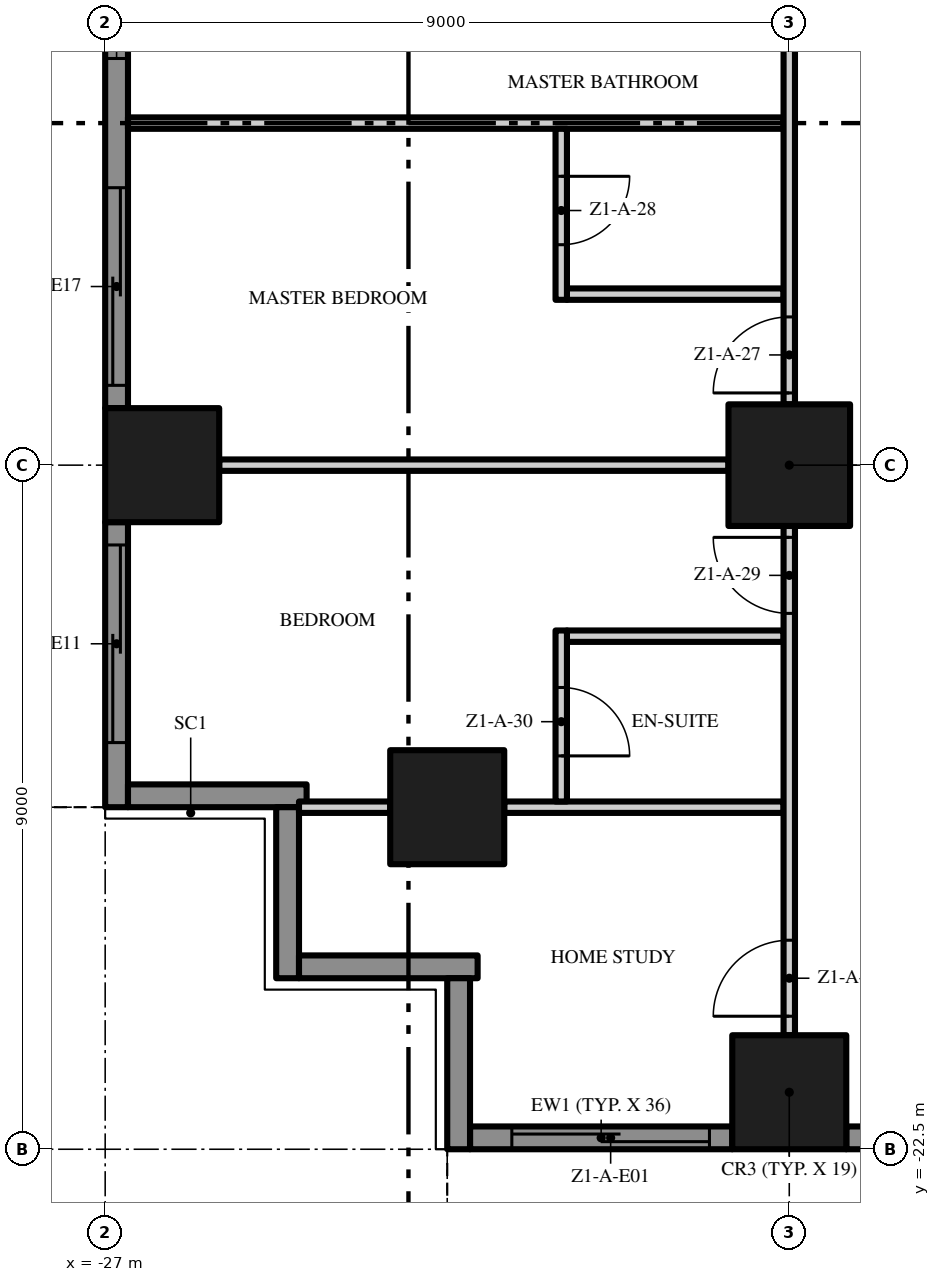
"""IFC4 building model, lengths in metres.
Left out: names, types, materials, properties, quantities, classifications, styles, units other than length and angle.
Written with IfcOpenShell. Run it as: python <this file> out.ifc"""

import sys

from ifc_helpers import new_model, si_unit, direction, frame, frame_2d, origin, origin_2d, place, context, subcontext, project, spatial, polyline, rectangle, outline, extrude, element, fill, save


model = new_model("IFC4")
c1 = context("Model", 3, precision=1e-05, world=origin(), true_north=direction((0.0, 1.0)))
c2 = subcontext(c1, "Body", "Model", "MODEL_VIEW")
j1 = project(units=[si_unit("LENGTHUNIT", "METRE"), si_unit("PLANEANGLEUNIT", "RADIAN")], contexts=[c1])
p1 = place(None, origin())
s1 = spatial("IfcSite", under=j1, at=p1, CompositionType="ELEMENT")
p2 = place(p1, origin())
s2 = spatial("IfcBuilding", under=s1, at=p2, CompositionType="ELEMENT")
p3 = place(p2, frame((0.0, 0.0, 18.8)))
s3 = spatial("IfcBuildingStorey", under=s2, at=p3, CompositionType="ELEMENT", Elevation=18.8)
p4 = place(p3, frame((-18.0, -13.5, 0.0), z_axis=(0.0, 0.0, 1.0), x_axis=(1.0, 0.0, 0.0)))
e1 = element("IfcColumn", 1, at=p4, inside=s3, PredefinedType="COLUMN", context=c2, shape_type="SweptSolid", body=[
    extrude(rectangle(XDim=1.6, YDim=1.6, at=origin_2d()), origin(), (0.0, 0.0, 1.0), 3.5),
])
for number, where, z_axis, x_axis in (
    (2, (-18.0, -21.75, 0.0), (0.0, 0.0, 1.0), (1.0, 0.0, 0.0)),
    (3, (-26.25, -13.5, 0.0), (0.0, 0.0, 1.0), (1.0, 0.0, 0.0)),
    (4, (-22.5, -18.0, 0.0), (0.0, 0.0, 1.0), (1.0, 0.0, 0.0)),
):
    element("IfcColumn", number, at=place(p3, frame(where, z_axis=z_axis, x_axis=x_axis)), inside=s3, PredefinedType="COLUMN", context=c2, shape_type="SweptSolid", body=[
        extrude(rectangle(XDim=1.5, YDim=1.5, at=origin_2d()), origin(), (0.0, 0.0, 1.0), 3.5),
    ])
p5 = place(p3, frame((-18.75, -22.35, 0.0), z_axis=(0.0, 0.0, 1.0), x_axis=(-1.0, 0.0, 0.0)))
e5 = element("IfcWall", 5, at=p5, inside=s3, PredefinedType="SOLIDWALL", context=c2, shape_type="SweptSolid", body=[
    extrude(rectangle(XDim=3.45, YDim=0.3, at=frame_2d((1.725, 0.0))), origin(), (0.0, 0.0, 1.0), 3.5),
])
p6 = place(p5, frame((0.3, 0.0, 0.0)))
e6 = element("IfcOpeningElement", 6, at=p6, cuts=e5, PredefinedType="OPENING", context=c2, shape_type="SweptSolid", body=[
    extrude(rectangle(XDim=2.6, YDim=2.4, at=frame_2d((1.3, 1.2))), frame((0.0, 0.16, 0.0), z_axis=(0.0, -1.0, 0.0), x_axis=(1.0, 0.0, 0.0)), (0.0, 0.0, 1.0), 0.32),
])
p7 = place(p3, frame((-9.75, -22.35, 0.0), z_axis=(0.0, 0.0, 1.0), x_axis=(-1.0, 0.0, 0.0)))
e7 = element("IfcWall", 7, at=p7, inside=s3, PredefinedType="SOLIDWALL", context=c2, shape_type="SweptSolid", body=[
    extrude(rectangle(XDim=7.5, YDim=0.3, at=frame_2d((3.75, 0.0))), origin(), (0.0, 0.0, 1.0), 3.5),
])
p8 = place(p7, frame((4.6, 0.0, 0.45)))
e8 = element("IfcOpeningElement", 8, at=p8, cuts=e7, PredefinedType="OPENING", context=c2, shape_type="SweptSolid", body=[
    extrude(rectangle(XDim=2.6, YDim=2.65, at=frame_2d((1.3, 1.325))), frame((0.0, 0.16, 0.0), z_axis=(0.0, -1.0, 0.0), x_axis=(1.0, 0.0, 0.0)), (0.0, 0.0, 1.0), 0.32),
])
p9 = place(p7, frame((0.3, 0.0, 0.45)))
e9 = element("IfcOpeningElement", 9, at=p9, cuts=e7, PredefinedType="OPENING", context=c2, shape_type="SweptSolid", body=[
    extrude(rectangle(XDim=2.6, YDim=2.65, at=frame_2d((1.3, 1.325))), frame((0.0, 0.16, 0.0), z_axis=(0.0, -1.0, 0.0), x_axis=(1.0, 0.0, 0.0)), (0.0, 0.0, 1.0), 0.32),
])
p10 = place(p3, frame((-26.85, -12.75, 0.0), z_axis=(0.0, 0.0, 1.0), x_axis=(0.0, 1.0, 0.0)))
e10 = element("IfcWall", 10, at=p10, inside=s3, PredefinedType="SOLIDWALL", context=c2, shape_type="SweptSolid", body=[
    extrude(rectangle(XDim=7.5, YDim=0.3, at=frame_2d((3.75, 0.0))), origin(), (0.0, 0.0, 1.0), 3.5),
])
p11 = place(p10, frame((4.6, 0.0, 0.45)))
e11 = element("IfcOpeningElement", 11, at=p11, cuts=e10, PredefinedType="OPENING", context=c2, shape_type="SweptSolid", body=[
    extrude(rectangle(XDim=2.6, YDim=2.65, at=frame_2d((1.3, 1.325))), frame((0.0, 0.16, 0.0), z_axis=(0.0, -1.0, 0.0), x_axis=(1.0, 0.0, 0.0)), (0.0, 0.0, 1.0), 0.32),
])
p12 = place(p10, frame((0.3, 0.0, 0.0)))
e12 = element("IfcOpeningElement", 12, at=p12, cuts=e10, PredefinedType="OPENING", context=c2, shape_type="SweptSolid", body=[
    extrude(rectangle(XDim=2.6, YDim=2.4, at=frame_2d((1.3, 1.2))), frame((0.0, 0.16, 0.0), z_axis=(0.0, -1.0, 0.0), x_axis=(1.0, 0.0, 0.0)), (0.0, 0.0, 1.0), 0.32),
])
p13 = place(p3, frame((-26.85, -18.0, 0.0), z_axis=(0.0, 0.0, 1.0), x_axis=(0.0, 1.0, 0.0)))
e13 = element("IfcWall", 13, at=p13, inside=s3, PredefinedType="SOLIDWALL", context=c2, shape_type="SweptSolid", body=[
    extrude(rectangle(XDim=3.75, YDim=0.3, at=frame_2d((1.875, 0.0))), origin(), (0.0, 0.0, 1.0), 3.5),
])
p14 = place(p13, frame((0.85, 0.0, 0.0)))
e14 = element("IfcOpeningElement", 14, at=p14, cuts=e13, PredefinedType="OPENING", context=c2, shape_type="SweptSolid", body=[
    extrude(rectangle(XDim=2.6, YDim=2.4, at=frame_2d((1.3, 1.2))), frame((0.0, 0.16, 0.0), z_axis=(0.0, -1.0, 0.0), x_axis=(1.0, 0.0, 0.0)), (0.0, 0.0, 1.0), 0.32),
])
p15 = place(p3, frame((-24.35, -17.85, 0.0), z_axis=(0.0, 0.0, 1.0), x_axis=(-1.0, 0.0, 0.0)))
e15 = element("IfcWall", 15, at=p15, inside=s3, PredefinedType="SOLIDWALL", context=c2, shape_type="SweptSolid", body=[
    extrude(rectangle(XDim=2.35, YDim=0.3, at=frame_2d((1.175, 0.0))), origin(), (0.0, 0.0, 1.0), 3.5),
])
p16 = place(p3, frame((-24.6, -20.25, 0.0), z_axis=(0.0, 0.0, 1.0), x_axis=(0.0, 1.0, 0.0)))
e16 = element("IfcWall", 16, at=p16, inside=s3, PredefinedType="SOLIDWALL", context=c2, shape_type="SweptSolid", body=[
    extrude(rectangle(XDim=2.25, YDim=0.3, at=frame_2d((1.125, 0.0))), origin(), (0.0, 0.0, 1.0), 3.5),
])
p17 = place(p3, frame((-22.1, -20.1, 0.0), z_axis=(0.0, 0.0, 1.0), x_axis=(-1.0, 0.0, 0.0)))
e17 = element("IfcWall", 17, at=p17, inside=s3, PredefinedType="SOLIDWALL", context=c2, shape_type="SweptSolid", body=[
    extrude(rectangle(XDim=2.35, YDim=0.3, at=frame_2d((1.175, 0.0))), origin(), (0.0, 0.0, 1.0), 3.5),
])
p18 = place(p3, frame((-22.35, -22.5, 0.0), z_axis=(0.0, 0.0, 1.0), x_axis=(0.0, 1.0, 0.0)))
e18 = element("IfcWall", 18, at=p18, inside=s3, PredefinedType="SOLIDWALL", context=c2, shape_type="SweptSolid", body=[
    extrude(rectangle(XDim=2.25, YDim=0.3, at=frame_2d((1.125, 0.0))), origin(), (0.0, 0.0, 1.0), 3.5),
])
p19 = place(p3, origin())
e19 = element("IfcWall", 19, at=p19, inside=s3, PredefinedType="USERDEFINED", context=c2, shape_type="SweptSolid", body=[
    extrude(outline(polyline([(-22.5, -25.149), (-21.0, -25.485), (-20.625, -25.5), (-19.5, -25.369), (-18.0, -24.845), (-16.5, -24.112), (-15.0, -23.451), (-13.5, -23.115), (-13.125, -23.1), (-12.0, -23.231), (-10.5, -23.755), (-9.0, -24.488), (-7.5, -25.149), (-6.0, -25.485), (-5.625, -25.5), (-4.5, -25.369), (-3.0, -24.845), (-1.5, -24.112), (0.0, -23.451), (1.5, -23.115), (1.875, -23.1), (3.0, -23.231), (4.5, -23.755), (6.0, -24.488), (7.5, -25.149), (9.0, -25.485), (9.375, -25.5), (10.5, -25.369), (12.0, -24.845), (13.5, -24.112), (15.0, -23.451), (16.5, -23.115), (16.875, -23.1), (18.0, -23.231), (19.5, -23.755), (21.0, -24.488), (22.5, -25.149), (22.601, -24.92), (21.105, -24.261), (19.596, -23.524), (18.056, -22.986), (16.885, -22.849), (16.467, -22.866), (14.921, -23.213), (13.395, -23.885), (11.904, -24.614), (10.444, -25.124), (9.365, -25.249), (9.033, -25.236), (7.579, -24.91), (6.105, -24.261), (4.596, -23.524), (3.056, -22.986), (1.885, -22.849), (1.467, -22.866), (-0.079, -23.213), (-1.605, -23.885), (-3.096, -24.614), (-4.556, -25.124), (-5.635, -25.249), (-5.967, -25.236), (-7.421, -24.91), (-8.895, -24.261), (-10.404, -23.524), (-11.944, -22.986), (-13.115, -22.849), (-13.533, -22.866), (-15.079, -23.213), (-16.605, -23.885), (-18.096, -24.614), (-19.556, -25.124), (-20.635, -25.249), (-20.967, -25.236), (-22.445, -24.905), (-22.5, -25.149)])), origin(), (0.0, 0.0, 1.0), 0.9),
])
p20 = place(p3, origin())
e20 = element("IfcWall", 20, at=p20, inside=s3, PredefinedType="USERDEFINED", context=c2, shape_type="SweptSolid", body=[
    extrude(outline(polyline([(-29.649, 18.0), (-29.985, 16.5), (-30.0, 16.125), (-29.869, 15.0), (-29.345, 13.5), (-28.612, 12.0), (-27.951, 10.5), (-27.615, 9.0), (-27.6, 8.625), (-27.731, 7.5), (-28.255, 6.0), (-28.988, 4.5), (-29.649, 3.0), (-29.985, 1.5), (-30.0, 1.125), (-29.869, 0.0), (-29.345, -1.5), (-28.612, -3.0), (-27.951, -4.5), (-27.615, -6.0), (-27.6, -6.375), (-27.731, -7.5), (-28.255, -9.0), (-28.988, -10.5), (-29.649, -12.0), (-29.985, -13.5), (-30.0, -13.875), (-29.869, -15.0), (-29.345, -16.5), (-28.612, -18.0), (-28.388, -17.89), (-29.114, -16.404), (-29.624, -14.944), (-29.749, -13.865), (-29.736, -13.533), (-29.41, -12.079), (-28.761, -10.605), (-28.024, -9.096), (-27.486, -7.556), (-27.349, -6.385), (-27.366, -5.967), (-27.713, -4.421), (-28.385, -2.895), (-29.114, -1.404), (-29.624, 0.056), (-29.749, 1.135), (-29.736, 1.467), (-29.41, 2.921), (-28.761, 4.395), (-28.024, 5.904), (-27.486, 7.444), (-27.349, 8.615), (-27.366, 9.033), (-27.713, 10.579), (-28.385, 12.105), (-29.114, 13.596), (-29.624, 15.056), (-29.749, 16.135), (-29.736, 16.467), (-29.405, 17.945), (-29.649, 18.0)])), origin(), (0.0, 0.0, 1.0), 0.9),
])
p21 = place(p3, frame((-24.45, -18.0, 0.0), z_axis=(0.0, 0.0, 1.0), x_axis=(1.0, 0.0, 0.0)))
e21 = element("IfcWall", 21, at=p21, inside=s3, PredefinedType="PARTITIONING", context=c2, shape_type="SweptSolid", body=[
    extrude(rectangle(XDim=1.2, YDim=0.15, at=frame_2d((0.6, 0.0))), origin(), (0.0, 0.0, 1.0), 3.5),
])
p22 = place(p3, frame((-21.75, -18.0, 0.0), z_axis=(0.0, 0.0, 1.0), x_axis=(1.0, 0.0, 0.0)))
e22 = element("IfcWall", 22, at=p22, inside=s3, PredefinedType="PARTITIONING", context=c2, shape_type="SweptSolid", body=[
    extrude(rectangle(XDim=3.675, YDim=0.15, at=frame_2d((1.837, 0.0))), origin(), (0.0, 0.0, 1.0), 3.5),
])
p23 = place(p3, frame((-20.925, -15.75, 0.0), z_axis=(0.0, 0.0, 1.0), x_axis=(1.0, 0.0, 0.0)))
e23 = element("IfcWall", 23, at=p23, inside=s3, PredefinedType="PARTITIONING", context=c2, shape_type="SweptSolid", body=[
    extrude(rectangle(XDim=2.85, YDim=0.15, at=frame_2d((1.425, 0.0))), origin(), (0.0, 0.0, 1.0), 3.5),
])
p24 = place(p3, frame((-25.5, -13.5, 0.0), z_axis=(0.0, 0.0, 1.0), x_axis=(1.0, 0.0, 0.0)))
e24 = element("IfcWall", 24, at=p24, inside=s3, PredefinedType="PARTITIONING", context=c2, shape_type="SweptSolid", body=[
    extrude(rectangle(XDim=6.7, YDim=0.15, at=frame_2d((3.35, 0.0))), origin(), (0.0, 0.0, 1.0), 3.5),
])
p25 = place(p3, frame((-20.925, -11.25, 0.0), z_axis=(0.0, 0.0, 1.0), x_axis=(1.0, 0.0, 0.0)))
e25 = element("IfcWall", 25, at=p25, inside=s3, PredefinedType="PARTITIONING", context=c2, shape_type="SweptSolid", body=[
    extrude(rectangle(XDim=2.85, YDim=0.15, at=frame_2d((1.425, 0.0))), origin(), (0.0, 0.0, 1.0), 3.5),
])
p26 = place(p3, frame((-26.7, -9.0, 0.0), z_axis=(0.0, 0.0, 1.0), x_axis=(1.0, 0.0, 0.0)))
e26 = element("IfcWall", 26, at=p26, inside=s3, PredefinedType="PARTITIONING", context=c2, shape_type="SweptSolid", body=[
    extrude(rectangle(XDim=8.625, YDim=0.15, at=frame_2d((4.312, 0.0))), origin(), (0.0, 0.0, 1.0), 3.5),
])
p27 = place(p3, frame((-21.0, -15.675, 0.0), z_axis=(0.0, 0.0, 1.0), x_axis=(0.0, -1.0, 0.0)))
e27 = element("IfcWall", 27, at=p27, inside=s3, PredefinedType="PARTITIONING", context=c2, shape_type="SweptSolid", body=[
    extrude(rectangle(XDim=2.25, YDim=0.15, at=frame_2d((1.125, 0.0))), origin(), (0.0, 0.0, 1.0), 3.5),
])
p28 = place(p27, frame((0.75, 0.0, 0.0)))
e28 = element("IfcOpeningElement", 28, at=p28, cuts=e27, PredefinedType="OPENING", context=c2, shape_type="SweptSolid", body=[
    extrude(rectangle(XDim=0.9, YDim=2.1, at=frame_2d((0.45, 1.05))), frame((0.0, 0.085, 0.0), z_axis=(0.0, -1.0, 0.0), x_axis=(1.0, 0.0, 0.0)), (0.0, 0.0, 1.0), 0.17),
])
p29 = place(p3, frame((-21.0, -9.075, 0.0), z_axis=(0.0, 0.0, 1.0), x_axis=(0.0, -1.0, 0.0)))
e29 = element("IfcWall", 29, at=p29, inside=s3, PredefinedType="PARTITIONING", context=c2, shape_type="SweptSolid", body=[
    extrude(rectangle(XDim=2.25, YDim=0.15, at=frame_2d((1.125, 0.0))), origin(), (0.0, 0.0, 1.0), 3.5),
])
p30 = place(p29, frame((0.625, 0.0, 0.0)))
e30 = element("IfcOpeningElement", 30, at=p30, cuts=e29, PredefinedType="OPENING", context=c2, shape_type="SweptSolid", body=[
    extrude(rectangle(XDim=0.9, YDim=2.1, at=frame_2d((0.45, 1.05))), frame((0.0, 0.085, 0.0), z_axis=(0.0, -1.0, 0.0), x_axis=(1.0, 0.0, 0.0)), (0.0, 0.0, 1.0), 0.17),
])
p31 = place(p3, frame((-18.0, -21.0, 0.0), z_axis=(0.0, 0.0, 1.0), x_axis=(0.0, 1.0, 0.0)))
e31 = element("IfcWall", 31, at=p31, inside=s3, PredefinedType="PARTITIONING", context=c2, shape_type="SweptSolid", body=[
    extrude(rectangle(XDim=6.7, YDim=0.15, at=frame_2d((3.35, 0.0))), origin(), (0.0, 0.0, 1.0), 3.5),
])
p32 = place(p31, frame((5.55, 0.0, 0.0)))
e32 = element("IfcOpeningElement", 32, at=p32, cuts=e31, PredefinedType="OPENING", context=c2, shape_type="SweptSolid", body=[
    extrude(rectangle(XDim=1.0, YDim=2.4, at=frame_2d((0.5, 1.2))), frame((0.0, 0.085, 0.0), z_axis=(0.0, -1.0, 0.0), x_axis=(1.0, 0.0, 0.0)), (0.0, 0.0, 1.0), 0.17),
])
p33 = place(p31, frame((0.25, 0.0, 0.0)))
e33 = element("IfcOpeningElement", 33, at=p33, cuts=e31, PredefinedType="OPENING", context=c2, shape_type="SweptSolid", body=[
    extrude(rectangle(XDim=1.0, YDim=2.4, at=frame_2d((0.5, 1.2))), frame((0.0, 0.085, 0.0), z_axis=(0.0, -1.0, 0.0), x_axis=(1.0, 0.0, 0.0)), (0.0, 0.0, 1.0), 0.17),
])
p34 = place(p3, frame((-18.0, -12.7, 0.0), z_axis=(0.0, 0.0, 1.0), x_axis=(0.0, 1.0, 0.0)))
e34 = element("IfcWall", 34, at=p34, inside=s3, PredefinedType="PARTITIONING", context=c2, shape_type="SweptSolid", body=[
    extrude(rectangle(XDim=7.4, YDim=0.15, at=frame_2d((3.7, 0.0))), origin(), (0.0, 0.0, 1.0), 3.5),
])
p35 = place(p34, frame((5.45, 0.0, 0.0)))
e35 = element("IfcOpeningElement", 35, at=p35, cuts=e34, PredefinedType="OPENING", context=c2, shape_type="SweptSolid", body=[
    extrude(rectangle(XDim=1.8, YDim=2.4, at=frame_2d((0.9, 1.2))), frame((0.0, 0.085, 0.0), z_axis=(0.0, -1.0, 0.0), x_axis=(1.0, 0.0, 0.0)), (0.0, 0.0, 1.0), 0.17),
])
p36 = place(p34, frame((0.15, 0.0, 0.0)))
e36 = element("IfcOpeningElement", 36, at=p36, cuts=e34, PredefinedType="OPENING", context=c2, shape_type="SweptSolid", body=[
    extrude(rectangle(XDim=1.0, YDim=2.4, at=frame_2d((0.5, 1.2))), frame((0.0, 0.085, 0.0), z_axis=(0.0, -1.0, 0.0), x_axis=(1.0, 0.0, 0.0)), (0.0, 0.0, 1.0), 0.17),
])
p37 = place(p6, origin())
e37 = element("IfcDoor", 37, at=p37, inside=s3, OperationType="SINGLE_SWING_LEFT", PredefinedType="DOOR", context=c2, shape_type="SweptSolid", body=[
    extrude(rectangle(XDim=2.6, YDim=2.4, at=frame_2d((1.3, 1.2))), frame((0.0, 0.025, 0.0), z_axis=(0.0, -1.0, 0.0), x_axis=(1.0, 0.0, 0.0)), (0.0, 0.0, 1.0), 0.05),
])
fill(e6, e37)
p38 = place(p11, origin())
e38 = element("IfcWindow", 38, at=p38, inside=s3, PartitioningType="SINGLE_PANEL", PredefinedType="WINDOW", context=c2, shape_type="SweptSolid", body=[
    extrude(rectangle(XDim=2.6, YDim=2.65, at=frame_2d((1.3, 1.325))), frame((0.0, 0.03, 0.0), z_axis=(0.0, -1.0, 0.0), x_axis=(1.0, 0.0, 0.0)), (0.0, 0.0, 1.0), 0.06),
])
fill(e11, e38)
p39 = place(p12, origin())
e39 = element("IfcDoor", 39, at=p39, inside=s3, OperationType="SINGLE_SWING_LEFT", PredefinedType="DOOR", context=c2, shape_type="SweptSolid", body=[
    extrude(rectangle(XDim=2.6, YDim=2.4, at=frame_2d((1.3, 1.2))), frame((0.0, 0.025, 0.0), z_axis=(0.0, -1.0, 0.0), x_axis=(1.0, 0.0, 0.0)), (0.0, 0.0, 1.0), 0.05),
])
fill(e12, e39)
p40 = place(p14, origin())
e40 = element("IfcDoor", 40, at=p40, inside=s3, OperationType="SINGLE_SWING_LEFT", PredefinedType="DOOR", context=c2, shape_type="SweptSolid", body=[
    extrude(rectangle(XDim=2.6, YDim=2.4, at=frame_2d((1.3, 1.2))), frame((0.0, 0.025, 0.0), z_axis=(0.0, -1.0, 0.0), x_axis=(1.0, 0.0, 0.0)), (0.0, 0.0, 1.0), 0.05),
])
fill(e14, e40)
p41 = place(p36, origin())
e41 = element("IfcDoor", 41, at=p41, inside=s3, OperationType="SINGLE_SWING_LEFT", PredefinedType="DOOR", context=c2, shape_type="SweptSolid", body=[
    extrude(rectangle(XDim=1.0, YDim=2.4, at=frame_2d((0.5, 1.2))), frame((0.0, 0.025, 0.0), z_axis=(0.0, -1.0, 0.0), x_axis=(1.0, 0.0, 0.0)), (0.0, 0.0, 1.0), 0.05),
])
fill(e36, e41)
p42 = place(p30, origin())
e42 = element("IfcDoor", 42, at=p42, inside=s3, OperationType="SINGLE_SWING_LEFT", PredefinedType="DOOR", context=c2, shape_type="SweptSolid", body=[
    extrude(rectangle(XDim=0.9, YDim=2.1, at=frame_2d((0.45, 1.05))), frame((0.0, 0.025, 0.0), z_axis=(0.0, -1.0, 0.0), x_axis=(1.0, 0.0, 0.0)), (0.0, 0.0, 1.0), 0.05),
])
fill(e30, e42)
p43 = place(p32, origin())
e43 = element("IfcDoor", 43, at=p43, inside=s3, OperationType="SINGLE_SWING_RIGHT", PredefinedType="DOOR", context=c2, shape_type="SweptSolid", body=[
    extrude(rectangle(XDim=1.0, YDim=2.4, at=frame_2d((0.5, 1.2))), frame((0.0, 0.025, 0.0), z_axis=(0.0, -1.0, 0.0), x_axis=(1.0, 0.0, 0.0)), (0.0, 0.0, 1.0), 0.05),
])
fill(e32, e43)
p44 = place(p28, origin())
e44 = element("IfcDoor", 44, at=p44, inside=s3, OperationType="SINGLE_SWING_RIGHT", PredefinedType="DOOR", context=c2, shape_type="SweptSolid", body=[
    extrude(rectangle(XDim=0.9, YDim=2.1, at=frame_2d((0.45, 1.05))), frame((0.0, 0.025, 0.0), z_axis=(0.0, -1.0, 0.0), x_axis=(1.0, 0.0, 0.0)), (0.0, 0.0, 1.0), 0.05),
])
fill(e28, e44)
p45 = place(p33, origin())
e45 = element("IfcDoor", 45, at=p45, inside=s3, OperationType="SINGLE_SWING_LEFT", PredefinedType="DOOR", context=c2, shape_type="SweptSolid", body=[
    extrude(rectangle(XDim=1.0, YDim=2.4, at=frame_2d((0.5, 1.2))), frame((0.0, 0.025, 0.0), z_axis=(0.0, -1.0, 0.0), x_axis=(1.0, 0.0, 0.0)), (0.0, 0.0, 1.0), 0.05),
])
fill(e33, e45)
save(model, sys.argv[1])
